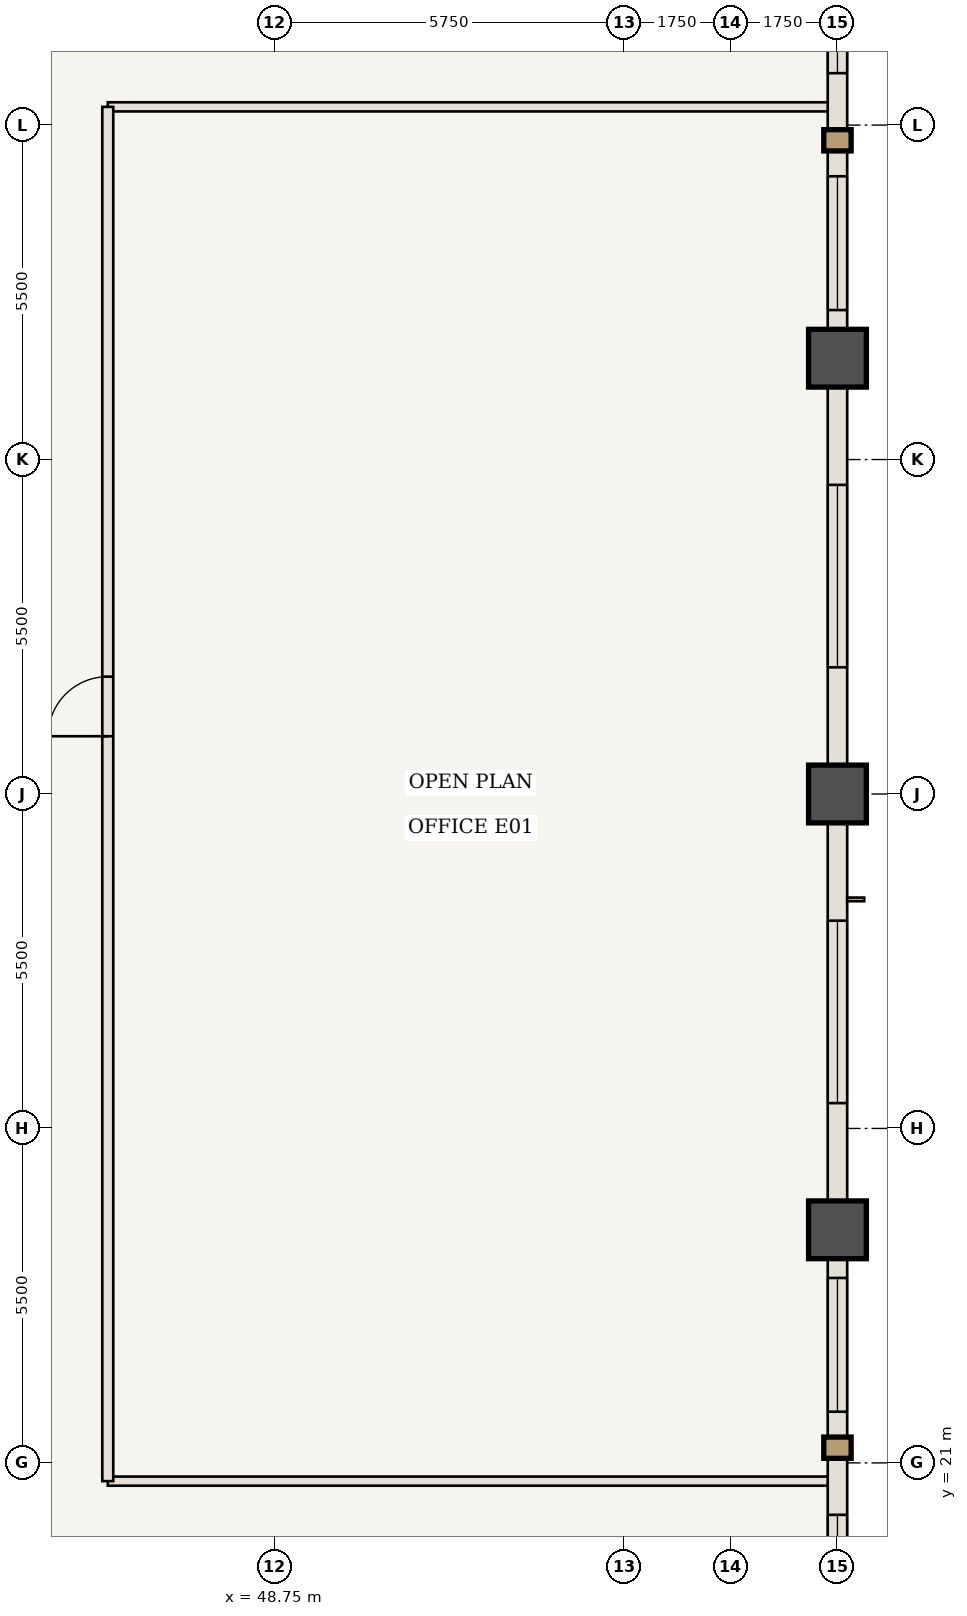
"""IFC4 building model, lengths in metres.
Left out: names, types, materials, properties, quantities, classifications, styles, units other than length and angle.
Written with IfcOpenShell. Run it as: python <this file> out.ifc"""

import sys

from ifc_helpers import new_model, si_unit, direction, frame, frame_2d, origin, origin_2d, place, context, subcontext, project, spatial, rectangle, extrude, element, fill, save


model = new_model("IFC4")
c1 = context("Model", 3, precision=1e-05, world=origin(), true_north=direction((0.0, 1.0)))
c2 = subcontext(c1, "Body", "Model", "MODEL_VIEW")
j1 = project(units=[si_unit("LENGTHUNIT", "METRE"), si_unit("PLANEANGLEUNIT", "RADIAN")], contexts=[c1])
p1 = place(None, origin())
s1 = spatial("IfcSite", under=j1, at=p1, CompositionType="ELEMENT")
p2 = place(p1, origin())
s2 = spatial("IfcBuilding", under=s1, at=p2, CompositionType="ELEMENT")
p3 = place(p2, frame((0.0, 0.0, 126.0)))
s3 = spatial("IfcBuildingStorey", under=s2, at=p3, CompositionType="ELEMENT", Elevation=126.0)
for number, where, z_axis, x_axis in (
    (1, (58.0, 24.833, 0.0), (0.0, 0.0, 1.0), (1.0, 0.0, 0.0)),
    (2, (58.0, 32.0, 0.0), (0.0, 0.0, 1.0), (1.0, 0.0, 0.0)),
    (3, (58.0, 39.167, 0.0), (0.0, 0.0, 1.0), (1.0, 0.0, 0.0)),
):
    element("IfcColumn", number, at=place(p3, frame(where, z_axis=z_axis, x_axis=x_axis)), inside=s3, PredefinedType="COLUMN", context=c2, shape_type="SweptSolid", body=[
        extrude(rectangle(XDim=0.95, YDim=0.95, at=origin_2d()), origin(), (0.0, 0.0, 1.0), 3.85),
    ])
for number, where, z_axis, x_axis in (
    (4, (46.0, 20.7, 0.0), (0.0, 0.0, 1.0), (1.0, 0.0, 0.0)),
    (5, (46.0, 43.3, 0.0), (0.0, 0.0, 1.0), (1.0, 0.0, 0.0)),
):
    element("IfcWall", number, at=place(p3, frame(where, z_axis=z_axis, x_axis=x_axis)), inside=s3, PredefinedType="STANDARD", context=c2, shape_type="SweptSolid", body=[
        extrude(rectangle(XDim=11.94, YDim=0.15, at=frame_2d((5.97, 0.0))), origin(), (0.0, 0.0, 1.0), 3.056),
    ])
p4 = place(p3, frame((46.0, 20.7, 0.0), z_axis=(0.0, 0.0, 1.0), x_axis=(0.0, 1.0, 0.0)))
e6 = element("IfcWall", 6, at=p4, inside=s3, PredefinedType="STANDARD", context=c2, shape_type="SweptSolid", body=[
    extrude(rectangle(XDim=22.6, YDim=0.18, at=frame_2d((11.3, 0.0))), origin(), (0.0, 0.0, 1.0), 3.685),
])
p5 = place(p4, frame((12.25, 0.0, 0.0)))
e7 = element("IfcOpeningElement", 7, at=p5, cuts=e6, PredefinedType="OPENING", context=c2, shape_type="SweptSolid", body=[
    extrude(rectangle(XDim=0.98, YDim=2.2, at=frame_2d((0.49, 1.1))), frame((0.0, 0.1, 0.0), z_axis=(0.0, -1.0, 0.0), x_axis=(1.0, 0.0, 0.0)), (0.0, 0.0, 1.0), 0.2),
])
p6 = place(p3, frame((58.0, 24.833, 0.0), z_axis=(0.0, 0.0, 1.0), x_axis=(0.0, -1.0, 0.0)))
e8 = element("IfcWall", 8, at=p6, inside=s3, PredefinedType="USERDEFINED", context=c2, shape_type="SweptSolid", body=[
    extrude(rectangle(XDim=7.167, YDim=0.32, at=frame_2d((3.583, 0.0))), origin(), (0.0, 0.0, 1.0), 2.885),
])
p7 = place(p6, frame((0.792, 0.0, 0.85)))
e9 = element("IfcOpeningElement", 9, at=p7, cuts=e8, PredefinedType="OPENING", context=c2, shape_type="SweptSolid", body=[
    extrude(rectangle(XDim=2.2, YDim=1.835, at=frame_2d((1.1, 0.917))), frame((0.0, 0.17, 0.0), z_axis=(0.0, -1.0, 0.0), x_axis=(1.0, 0.0, 0.0)), (0.0, 0.0, 1.0), 0.34),
])
p8 = place(p6, frame((4.688, 0.0, 0.85)))
e10 = element("IfcOpeningElement", 10, at=p8, cuts=e8, PredefinedType="OPENING", context=c2, shape_type="SweptSolid", body=[
    extrude(rectangle(XDim=1.6, YDim=1.835, at=frame_2d((0.8, 0.917))), frame((0.0, 0.17, 0.0), z_axis=(0.0, -1.0, 0.0), x_axis=(1.0, 0.0, 0.0)), (0.0, 0.0, 1.0), 0.34),
])
p9 = place(p3, frame((58.0, 32.0, 0.0), z_axis=(0.0, 0.0, 1.0), x_axis=(0.0, -1.0, 0.0)))
e11 = element("IfcWall", 11, at=p9, inside=s3, PredefinedType="USERDEFINED", context=c2, shape_type="SweptSolid", body=[
    extrude(rectangle(XDim=7.167, YDim=0.32, at=frame_2d((3.583, 0.0))), origin(), (0.0, 0.0, 1.0), 2.885),
])
p10 = place(p9, frame((2.083, 0.0, 0.85)))
e12 = element("IfcOpeningElement", 12, at=p10, cuts=e11, PredefinedType="OPENING", context=c2, shape_type="SweptSolid", body=[
    extrude(rectangle(XDim=3.0, YDim=1.835, at=frame_2d((1.5, 0.917))), frame((0.0, 0.17, 0.0), z_axis=(0.0, -1.0, 0.0), x_axis=(1.0, 0.0, 0.0)), (0.0, 0.0, 1.0), 0.34),
])
p11 = place(p3, frame((58.0, 39.167, 0.0), z_axis=(0.0, 0.0, 1.0), x_axis=(0.0, -1.0, 0.0)))
e13 = element("IfcWall", 13, at=p11, inside=s3, PredefinedType="USERDEFINED", context=c2, shape_type="SweptSolid", body=[
    extrude(rectangle(XDim=7.167, YDim=0.32, at=frame_2d((3.583, 0.0))), origin(), (0.0, 0.0, 1.0), 2.885),
])
p12 = place(p11, frame((2.083, 0.0, 0.85)))
e14 = element("IfcOpeningElement", 14, at=p12, cuts=e13, PredefinedType="OPENING", context=c2, shape_type="SweptSolid", body=[
    extrude(rectangle(XDim=3.0, YDim=1.835, at=frame_2d((1.5, 0.917))), frame((0.0, 0.17, 0.0), z_axis=(0.0, -1.0, 0.0), x_axis=(1.0, 0.0, 0.0)), (0.0, 0.0, 1.0), 0.34),
])
p13 = place(p3, frame((58.0, 46.333, 0.0), z_axis=(0.0, 0.0, 1.0), x_axis=(0.0, -1.0, 0.0)))
e15 = element("IfcWall", 15, at=p13, inside=s3, PredefinedType="USERDEFINED", context=c2, shape_type="SweptSolid", body=[
    extrude(rectangle(XDim=7.167, YDim=0.32, at=frame_2d((3.583, 0.0))), origin(), (0.0, 0.0, 1.0), 2.885),
])
p14 = place(p13, frame((0.879, 0.0, 0.85)))
e16 = element("IfcOpeningElement", 16, at=p14, cuts=e15, PredefinedType="OPENING", context=c2, shape_type="SweptSolid", body=[
    extrude(rectangle(XDim=1.6, YDim=1.835, at=frame_2d((0.8, 0.917))), frame((0.0, 0.17, 0.0), z_axis=(0.0, -1.0, 0.0), x_axis=(1.0, 0.0, 0.0)), (0.0, 0.0, 1.0), 0.34),
])
p15 = place(p13, frame((4.175, 0.0, 0.85)))
e17 = element("IfcOpeningElement", 17, at=p15, cuts=e15, PredefinedType="OPENING", context=c2, shape_type="SweptSolid", body=[
    extrude(rectangle(XDim=2.2, YDim=1.835, at=frame_2d((1.1, 0.917))), frame((0.0, 0.17, 0.0), z_axis=(0.0, -1.0, 0.0), x_axis=(1.0, 0.0, 0.0)), (0.0, 0.0, 1.0), 0.34),
])
p16 = place(p5, origin())
e18 = element("IfcDoor", 18, at=p16, inside=s3, OperationType="SINGLE_SWING_LEFT", PredefinedType="DOOR", context=c2, shape_type="SweptSolid", body=[
    extrude(rectangle(XDim=0.98, YDim=2.2, at=frame_2d((0.49, 1.1))), frame((0.0, 0.025, 0.0), z_axis=(0.0, -1.0, 0.0), x_axis=(1.0, 0.0, 0.0)), (0.0, 0.0, 1.0), 0.05),
])
fill(e7, e18)
p17 = place(p7, origin())
e19 = element("IfcWindow", 19, at=p17, inside=s3, PartitioningType="SINGLE_PANEL", PredefinedType="WINDOW", context=c2, shape_type="SweptSolid", body=[
    extrude(rectangle(XDim=2.2, YDim=1.835, at=frame_2d((1.1, 0.917))), frame((0.0, 0.03, 0.0), z_axis=(0.0, -1.0, 0.0), x_axis=(1.0, 0.0, 0.0)), (0.0, 0.0, 1.0), 0.06),
])
fill(e9, e19)
p18 = place(p8, origin())
e20 = element("IfcWindow", 20, at=p18, inside=s3, PartitioningType="SINGLE_PANEL", PredefinedType="WINDOW", context=c2, shape_type="SweptSolid", body=[
    extrude(rectangle(XDim=1.6, YDim=1.835, at=frame_2d((0.8, 0.917))), frame((0.0, 0.03, 0.0), z_axis=(0.0, -1.0, 0.0), x_axis=(1.0, 0.0, 0.0)), (0.0, 0.0, 1.0), 0.06),
])
fill(e10, e20)
p19 = place(p10, origin())
e21 = element("IfcWindow", 21, at=p19, inside=s3, PartitioningType="SINGLE_PANEL", PredefinedType="WINDOW", context=c2, shape_type="SweptSolid", body=[
    extrude(rectangle(XDim=3.0, YDim=1.835, at=frame_2d((1.5, 0.917))), frame((0.0, 0.03, 0.0), z_axis=(0.0, -1.0, 0.0), x_axis=(1.0, 0.0, 0.0)), (0.0, 0.0, 1.0), 0.06),
])
fill(e12, e21)
p20 = place(p12, origin())
e22 = element("IfcWindow", 22, at=p20, inside=s3, PartitioningType="SINGLE_PANEL", PredefinedType="WINDOW", context=c2, shape_type="SweptSolid", body=[
    extrude(rectangle(XDim=3.0, YDim=1.835, at=frame_2d((1.5, 0.917))), frame((0.0, 0.03, 0.0), z_axis=(0.0, -1.0, 0.0), x_axis=(1.0, 0.0, 0.0)), (0.0, 0.0, 1.0), 0.06),
])
fill(e14, e22)
p21 = place(p14, origin())
e23 = element("IfcWindow", 23, at=p21, inside=s3, PartitioningType="SINGLE_PANEL", PredefinedType="WINDOW", context=c2, shape_type="SweptSolid", body=[
    extrude(rectangle(XDim=1.6, YDim=1.835, at=frame_2d((0.8, 0.917))), frame((0.0, 0.03, 0.0), z_axis=(0.0, -1.0, 0.0), x_axis=(1.0, 0.0, 0.0)), (0.0, 0.0, 1.0), 0.06),
])
fill(e16, e23)
p22 = place(p15, origin())
e24 = element("IfcWindow", 24, at=p22, inside=s3, PartitioningType="SINGLE_PANEL", PredefinedType="WINDOW", context=c2, shape_type="SweptSolid", body=[
    extrude(rectangle(XDim=2.2, YDim=1.835, at=frame_2d((1.1, 0.917))), frame((0.0, 0.03, 0.0), z_axis=(0.0, -1.0, 0.0), x_axis=(1.0, 0.0, 0.0)), (0.0, 0.0, 1.0), 0.06),
])
fill(e17, e24)
save(model, sys.argv[1])
